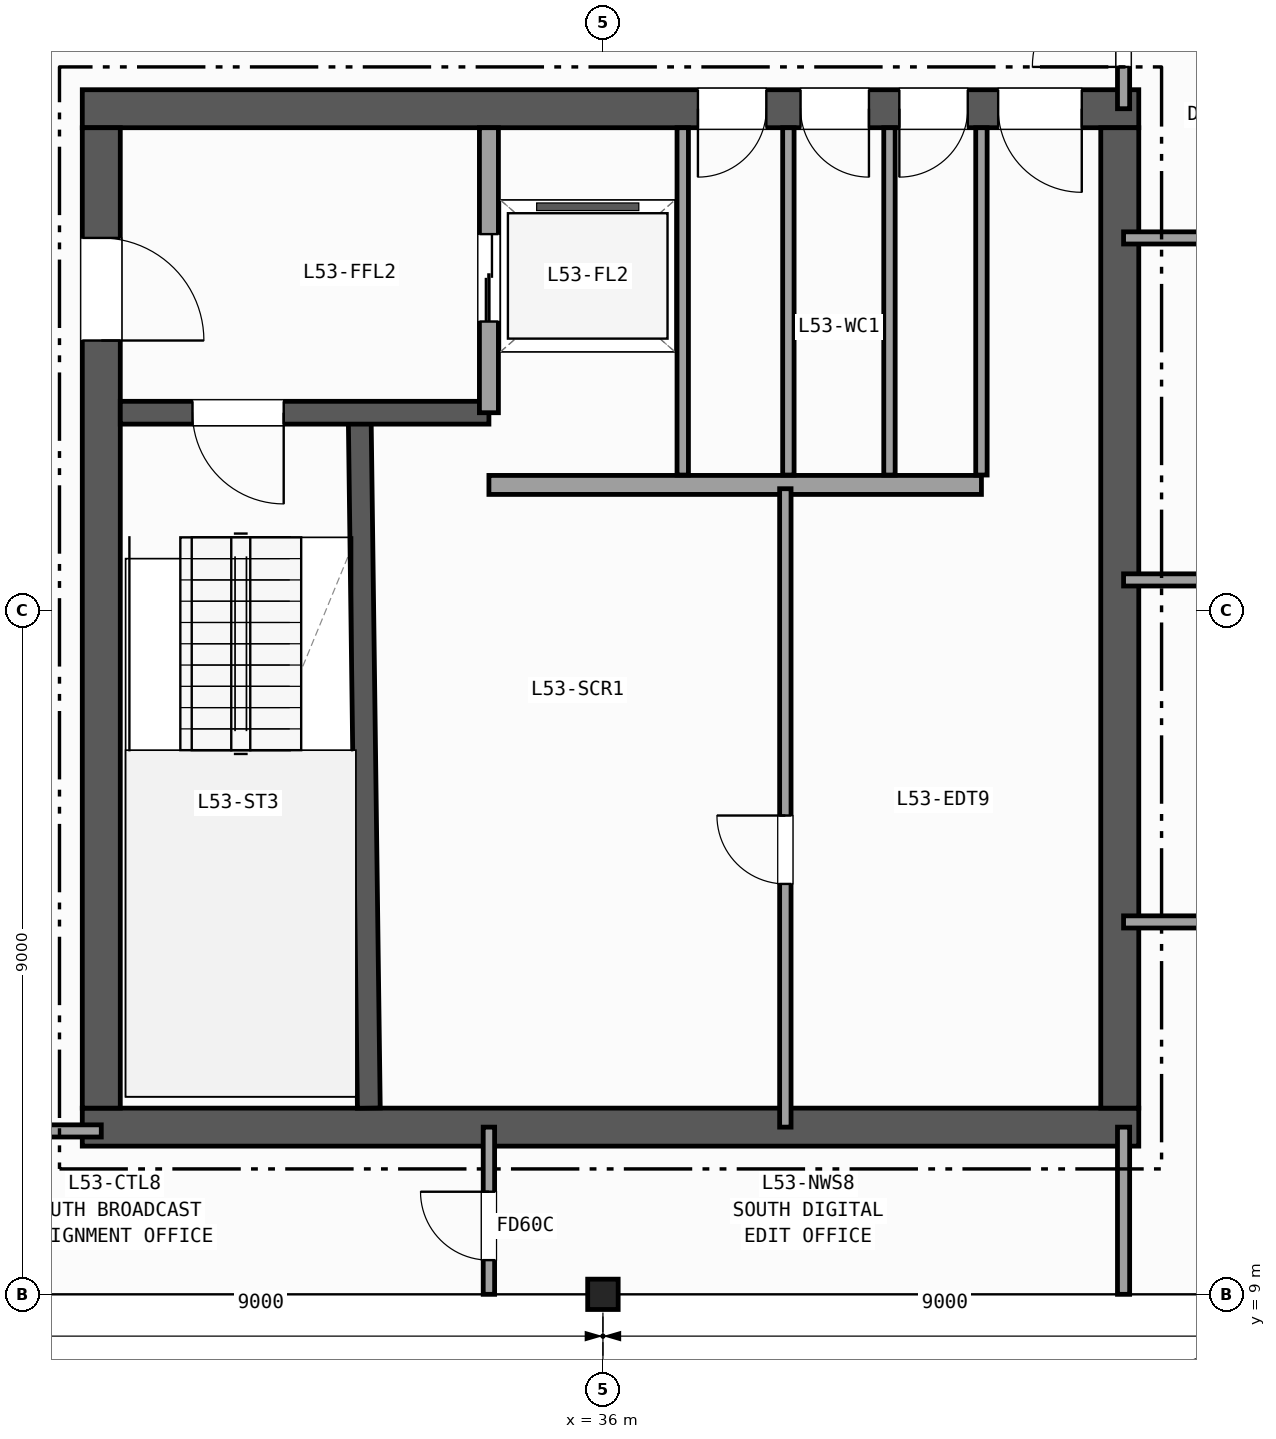
"""IFC4 building model, lengths in metres.
Left out: names, types, materials, properties, quantities, classifications, styles, units other than length and angle.
Written with IfcOpenShell. Run it as: python <this file> out.ifc"""

import sys

from ifc_helpers import new_model, si_unit, direction, frame, frame_2d, origin, origin_2d, place, context, subcontext, project, spatial, rectangle, i_section, extrude, element, fill, save


model = new_model("IFC4")
c1 = context("Model", 3, precision=1e-05, world=origin(), true_north=direction((0.0, 1.0)))
c2 = subcontext(c1, "Body", "Model", "MODEL_VIEW")
j1 = project(units=[si_unit("LENGTHUNIT", "METRE"), si_unit("PLANEANGLEUNIT", "RADIAN")], contexts=[c1])
p1 = place(None, origin())
s1 = spatial("IfcSite", under=j1, at=p1, CompositionType="ELEMENT")
p2 = place(p1, origin())
s2 = spatial("IfcBuilding", under=s1, at=p2, CompositionType="ELEMENT")
p3 = place(p2, frame((0.0, 0.0, 213.6)))
s3 = spatial("IfcBuildingStorey", under=s2, at=p3, CompositionType="ELEMENT", Elevation=213.6)
p4 = place(p3, frame((36.0, 9.0, 0.0), z_axis=(0.0, 0.0, 1.0), x_axis=(1.0, 0.0, 0.0)))
e1 = element("IfcColumn", 1, at=p4, inside=s3, PredefinedType="COLUMN", context=c2, shape_type="SweptSolid", body=[
    extrude(i_section(OverallWidth=0.401, OverallDepth=0.399, WebThickness=0.025, FlangeThickness=0.04, FilletRadius=0.015, at=origin_2d()), origin(), (0.0, 0.0, 1.0), 3.7),
])
p5 = place(p3, frame((29.15, 11.2, 0.0), z_axis=(0.0, 0.0, 1.0), x_axis=(1.0, 0.0, 0.0)))
e2 = element("IfcWall", 2, at=p5, inside=s3, PredefinedType="SHEAR", context=c2, shape_type="SweptSolid", body=[
    extrude(rectangle(XDim=13.9, YDim=0.5, at=frame_2d((6.95, 0.0))), origin(), (0.0, 0.0, 1.0), 3.42),
])
p6 = place(p3, frame((43.05, 24.6, 0.0), z_axis=(0.0, 0.0, 1.0), x_axis=(-1.0, 0.0, 0.0)))
e3 = element("IfcWall", 3, at=p6, inside=s3, PredefinedType="SHEAR", context=c2, shape_type="SweptSolid", body=[
    extrude(rectangle(XDim=13.9, YDim=0.5, at=frame_2d((6.95, 0.0))), origin(), (0.0, 0.0, 1.0), 3.42),
])
p7 = place(p6, frame((0.75, 0.0, 0.0)))
e4 = element("IfcOpeningElement", 4, at=p7, cuts=e3, PredefinedType="OPENING", context=c2, shape_type="SweptSolid", body=[
    extrude(rectangle(XDim=1.1, YDim=2.15, at=frame_2d((0.55, 1.075))), frame((0.0, 0.26, 0.0), z_axis=(0.0, -1.0, 0.0), x_axis=(1.0, 0.0, 0.0)), (0.0, 0.0, 1.0), 0.52),
])
p8 = place(p6, frame((2.25, 0.0, 0.0)))
e5 = element("IfcOpeningElement", 5, at=p8, cuts=e3, PredefinedType="OPENING", context=c2, shape_type="SweptSolid", body=[
    extrude(rectangle(XDim=0.9, YDim=2.1, at=frame_2d((0.45, 1.05))), frame((0.0, 0.26, 0.0), z_axis=(0.0, -1.0, 0.0), x_axis=(1.0, 0.0, 0.0)), (0.0, 0.0, 1.0), 0.52),
])
p9 = place(p6, frame((3.55, 0.0, 0.0)))
e6 = element("IfcOpeningElement", 6, at=p9, cuts=e3, PredefinedType="OPENING", context=c2, shape_type="SweptSolid", body=[
    extrude(rectangle(XDim=0.9, YDim=2.1, at=frame_2d((0.45, 1.05))), frame((0.0, 0.26, 0.0), z_axis=(0.0, -1.0, 0.0), x_axis=(1.0, 0.0, 0.0)), (0.0, 0.0, 1.0), 0.52),
])
p10 = place(p6, frame((4.9, 0.0, 0.0)))
e7 = element("IfcOpeningElement", 7, at=p10, cuts=e3, PredefinedType="OPENING", context=c2, shape_type="SweptSolid", body=[
    extrude(rectangle(XDim=0.9, YDim=2.1, at=frame_2d((0.45, 1.05))), frame((0.0, 0.26, 0.0), z_axis=(0.0, -1.0, 0.0), x_axis=(1.0, 0.0, 0.0)), (0.0, 0.0, 1.0), 0.52),
])
p11 = place(p3, frame((29.4, 24.35, 0.0), z_axis=(0.0, 0.0, 1.0), x_axis=(0.0, -1.0, 0.0)))
e8 = element("IfcWall", 8, at=p11, inside=s3, PredefinedType="SHEAR", context=c2, shape_type="SweptSolid", body=[
    extrude(rectangle(XDim=12.9, YDim=0.5, at=frame_2d((6.45, 0.0))), origin(), (0.0, 0.0, 1.0), 3.42),
])
p12 = place(p11, frame((1.45, 0.0, 0.0)))
e9 = element("IfcOpeningElement", 9, at=p12, cuts=e8, PredefinedType="OPENING", context=c2, shape_type="SweptSolid", body=[
    extrude(rectangle(XDim=1.35, YDim=2.15, at=frame_2d((0.675, 1.075))), frame((0.0, 0.26, 0.0), z_axis=(0.0, -1.0, 0.0), x_axis=(1.0, 0.0, 0.0)), (0.0, 0.0, 1.0), 0.52),
])
p13 = place(p3, frame((42.8, 11.45, 0.0), z_axis=(0.0, 0.0, 1.0), x_axis=(0.0, 1.0, 0.0)))
e10 = element("IfcWall", 10, at=p13, inside=s3, PredefinedType="SHEAR", context=c2, shape_type="SweptSolid", body=[
    extrude(rectangle(XDim=12.9, YDim=0.5, at=frame_2d((6.45, 0.0))), origin(), (0.0, 0.0, 1.0), 3.42),
])
p14 = place(p3, frame((32.92, 11.45, 0.0), z_axis=(0.0, 0.0, 1.0), x_axis=(-0.013171578211, 0.999913251001, 0.0)))
e11 = element("IfcWall", 11, at=p14, inside=s3, PredefinedType="SHEAR", context=c2, shape_type="SweptSolid", body=[
    extrude(rectangle(XDim=9.101, YDim=0.3, at=frame_2d((4.55, 0.0))), origin(), (0.0, 0.0, 1.0), 3.42),
])
p15 = place(p3, frame((34.5, 20.6, 0.0), z_axis=(0.0, 0.0, 1.0), x_axis=(-1.0, 0.0, 0.0)))
e12 = element("IfcWall", 12, at=p15, inside=s3, PredefinedType="SHEAR", context=c2, shape_type="SweptSolid", body=[
    extrude(rectangle(XDim=4.85, YDim=0.3, at=frame_2d((2.425, 0.0))), origin(), (0.0, 0.0, 1.0), 3.42),
])
p16 = place(p15, frame((2.7, 0.0, 0.0)))
e13 = element("IfcOpeningElement", 13, at=p16, cuts=e12, PredefinedType="OPENING", context=c2, shape_type="SweptSolid", body=[
    extrude(rectangle(XDim=1.2, YDim=2.15, at=frame_2d((0.6, 1.075))), frame((0.0, 0.16, 0.0), z_axis=(0.0, -1.0, 0.0), x_axis=(1.0, 0.0, 0.0)), (0.0, 0.0, 1.0), 0.32),
])
p17 = place(p3, frame((34.5, 20.6, 0.0), z_axis=(0.0, 0.0, 1.0), x_axis=(0.0, 1.0, 0.0)))
e14 = element("IfcWall", 14, at=p17, inside=s3, PredefinedType="PARTITIONING", context=c2, shape_type="SweptSolid", body=[
    extrude(rectangle(XDim=3.75, YDim=0.25, at=frame_2d((1.875, 0.0))), origin(), (0.0, 0.0, 1.0), 3.42),
])
p18 = place(p17, frame((1.2, 0.0, 0.0)))
e15 = element("IfcOpeningElement", 15, at=p18, cuts=e14, PredefinedType="OPENING", context=c2, shape_type="SweptSolid", body=[
    extrude(rectangle(XDim=1.15, YDim=2.15, at=frame_2d((0.575, 1.075))), frame((0.0, 0.135, 0.0), z_axis=(0.0, -1.0, 0.0), x_axis=(1.0, 0.0, 0.0)), (0.0, 0.0, 1.0), 0.27),
])
p19 = place(p3, frame((34.5, 19.65, 0.0), z_axis=(0.0, 0.0, 1.0), x_axis=(1.0, 0.0, 0.0)))
e16 = element("IfcWall", 16, at=p19, inside=s3, PredefinedType="PARTITIONING", context=c2, shape_type="SweptSolid", body=[
    extrude(rectangle(XDim=6.48, YDim=0.25, at=frame_2d((3.24, 0.0))), origin(), (0.0, 0.0, 1.0), 3.42),
])
p20 = place(p3, frame((38.4, 11.2, 0.0), z_axis=(0.0, 0.0, 1.0), x_axis=(0.0, 1.0, 0.0)))
e17 = element("IfcWall", 17, at=p20, inside=s3, PredefinedType="PARTITIONING", context=c2, shape_type="SweptSolid", body=[
    extrude(rectangle(XDim=8.4, YDim=0.15, at=frame_2d((4.2, 0.0))), origin(), (0.0, 0.0, 1.0), 3.42),
])
p21 = place(p20, frame((3.2, 0.0, 0.0)))
e18 = element("IfcOpeningElement", 18, at=p21, cuts=e17, PredefinedType="OPENING", context=c2, shape_type="SweptSolid", body=[
    extrude(rectangle(XDim=0.9, YDim=2.1, at=frame_2d((0.45, 1.05))), frame((0.0, 0.085, 0.0), z_axis=(0.0, -1.0, 0.0), x_axis=(1.0, 0.0, 0.0)), (0.0, 0.0, 1.0), 0.17),
])
for number, where, z_axis, x_axis in (
    (19, (37.05, 19.78, 0.0), (0.0, 0.0, 1.0), (0.0, 1.0, 0.0)),
    (20, (38.44, 19.78, 0.0), (0.0, 0.0, 1.0), (0.0, 1.0, 0.0)),
    (21, (39.77, 19.78, 0.0), (0.0, 0.0, 1.0), (0.0, 1.0, 0.0)),
    (22, (40.98, 19.78, 0.0), (0.0, 0.0, 1.0), (0.0, 1.0, 0.0)),
):
    element("IfcWall", number, at=place(p3, frame(where, z_axis=z_axis, x_axis=x_axis)), inside=s3, PredefinedType="PARTITIONING", context=c2, shape_type="SweptSolid", body=[
        extrude(rectangle(XDim=4.57, YDim=0.15, at=frame_2d((2.285, 0.0))), origin(), (0.0, 0.0, 1.0), 3.42),
    ])
p22 = place(p3, frame((24.65, 11.15, 0.0), z_axis=(0.0, 0.0, 1.0), x_axis=(1.0, 0.0, 0.0)))
e23 = element("IfcWall", 23, at=p22, inside=s3, PredefinedType="PARTITIONING", context=c2, shape_type="SweptSolid", body=[
    extrude(rectangle(XDim=4.75, YDim=0.16, at=frame_2d((2.375, 0.0))), origin(), (0.0, 0.0, 1.0), 2.792),
])
p23 = place(p22, frame((1.2, 0.0, 0.0)))
e24 = element("IfcOpeningElement", 24, at=p23, cuts=e23, PredefinedType="OPENING", context=c2, shape_type="SweptSolid", body=[
    extrude(rectangle(XDim=1.0, YDim=2.1, at=frame_2d((0.5, 1.05))), frame((0.0, 0.09, 0.0), z_axis=(0.0, -1.0, 0.0), x_axis=(1.0, 0.0, 0.0)), (0.0, 0.0, 1.0), 0.18),
])
p24 = place(p3, frame((34.5, 9.0, 0.0), z_axis=(0.0, 0.0, 1.0), x_axis=(0.0, 1.0, 0.0)))
e25 = element("IfcWall", 25, at=p24, inside=s3, PredefinedType="PARTITIONING", context=c2, shape_type="SweptSolid", body=[
    extrude(rectangle(XDim=2.2, YDim=0.15, at=frame_2d((1.1, 0.0))), origin(), (0.0, 0.0, 1.0), 2.707),
])
p25 = place(p24, frame((0.45, 0.0, 0.0)))
e26 = element("IfcOpeningElement", 26, at=p25, cuts=e25, PredefinedType="OPENING", context=c2, shape_type="SweptSolid", body=[
    extrude(rectangle(XDim=0.9, YDim=2.1, at=frame_2d((0.45, 1.05))), frame((0.0, 0.085, 0.0), z_axis=(0.0, -1.0, 0.0), x_axis=(1.0, 0.0, 0.0)), (0.0, 0.0, 1.0), 0.17),
])
p26 = place(p3, frame((42.85, 9.0, 0.0), z_axis=(0.0, 0.0, 1.0), x_axis=(0.0, 1.0, 0.0)))
e27 = element("IfcWall", 27, at=p26, inside=s3, PredefinedType="PARTITIONING", context=c2, shape_type="SweptSolid", body=[
    extrude(rectangle(XDim=2.2, YDim=0.16, at=frame_2d((1.1, 0.0))), origin(), (0.0, 0.0, 1.0), 2.707),
])
p27 = place(p3, frame((42.85, 24.6, 0.0), z_axis=(0.0, 0.0, 1.0), x_axis=(0.0, 1.0, 0.0)))
e28 = element("IfcWall", 28, at=p27, inside=s3, PredefinedType="PARTITIONING", context=c2, shape_type="SweptSolid", body=[
    extrude(rectangle(XDim=2.4, YDim=0.16, at=frame_2d((1.2, 0.0))), origin(), (0.0, 0.0, 1.0), 2.707),
])
p28 = place(p27, frame((0.55, 0.0, 0.0)))
e29 = element("IfcOpeningElement", 29, at=p28, cuts=e28, PredefinedType="OPENING", context=c2, shape_type="SweptSolid", body=[
    extrude(rectangle(XDim=1.2, YDim=2.15, at=frame_2d((0.6, 1.075))), frame((0.0, 0.09, 0.0), z_axis=(0.0, -1.0, 0.0), x_axis=(1.0, 0.0, 0.0)), (0.0, 0.0, 1.0), 0.18),
])
p29 = place(p3, frame((42.85, 13.9, 0.0), z_axis=(0.0, 0.0, 1.0), x_axis=(1.0, 0.0, 0.0)))
e30 = element("IfcWall", 30, at=p29, inside=s3, PredefinedType="PARTITIONING", context=c2, shape_type="SweptSolid", body=[
    extrude(rectangle(XDim=11.865, YDim=0.16, at=frame_2d((5.933, 0.0))), origin(), (0.0, 0.0, 1.0), 3.42),
])
p30 = place(p29, frame((4.6, 0.0, 0.0)))
e31 = element("IfcOpeningElement", 31, at=p30, cuts=e30, PredefinedType="OPENING", context=c2, shape_type="SweptSolid", body=[
    extrude(rectangle(XDim=0.86, YDim=2.05, at=frame_2d((0.43, 1.025))), frame((0.0, 0.09, 0.0), z_axis=(0.0, -1.0, 0.0), x_axis=(1.0, 0.0, 0.0)), (0.0, 0.0, 1.0), 0.18),
])
p31 = place(p3, frame((42.85, 18.4, 0.0), z_axis=(0.0, 0.0, 1.0), x_axis=(1.0, 0.0, 0.0)))
e32 = element("IfcWall", 32, at=p31, inside=s3, PredefinedType="PARTITIONING", context=c2, shape_type="SweptSolid", body=[
    extrude(rectangle(XDim=11.15, YDim=0.16, at=frame_2d((5.575, 0.0))), origin(), (0.0, 0.0, 1.0), 3.42),
])
p32 = place(p31, frame((4.6, 0.0, 0.0)))
e33 = element("IfcOpeningElement", 33, at=p32, cuts=e32, PredefinedType="OPENING", context=c2, shape_type="SweptSolid", body=[
    extrude(rectangle(XDim=0.95, YDim=2.1, at=frame_2d((0.475, 1.05))), frame((0.0, 0.09, 0.0), z_axis=(0.0, -1.0, 0.0), x_axis=(1.0, 0.0, 0.0)), (0.0, 0.0, 1.0), 0.18),
])
p33 = place(p3, frame((42.85, 22.9, 0.0), z_axis=(0.0, 0.0, 1.0), x_axis=(1.0, 0.0, 0.0)))
e34 = element("IfcWall", 34, at=p33, inside=s3, PredefinedType="PARTITIONING", context=c2, shape_type="SweptSolid", body=[
    extrude(rectangle(XDim=11.653, YDim=0.16, at=frame_2d((5.826, 0.0))), origin(), (0.0, 0.0, 1.0), 3.42),
])
p34 = place(p33, frame((4.6, 0.0, 0.0)))
e35 = element("IfcOpeningElement", 35, at=p34, cuts=e34, PredefinedType="OPENING", context=c2, shape_type="SweptSolid", body=[
    extrude(rectangle(XDim=1.0, YDim=2.1, at=frame_2d((0.5, 1.05))), frame((0.0, 0.09, 0.0), z_axis=(0.0, -1.0, 0.0), x_axis=(1.0, 0.0, 0.0)), (0.0, 0.0, 1.0), 0.18),
])
p35 = place(p16, origin())
e36 = element("IfcDoor", 36, at=p35, inside=s3, OperationType="SINGLE_SWING_LEFT", PredefinedType="DOOR", context=c2, shape_type="SweptSolid", body=[
    extrude(rectangle(XDim=1.2, YDim=2.15, at=frame_2d((0.6, 1.075))), frame((0.0, 0.025, 0.0), z_axis=(0.0, -1.0, 0.0), x_axis=(1.0, 0.0, 0.0)), (0.0, 0.0, 1.0), 0.05),
])
fill(e13, e36)
p36 = place(p12, origin())
e37 = element("IfcDoor", 37, at=p36, inside=s3, OperationType="SINGLE_SWING_RIGHT", PredefinedType="DOOR", context=c2, shape_type="SweptSolid", body=[
    extrude(rectangle(XDim=1.35, YDim=2.15, at=frame_2d((0.675, 1.075))), frame((0.0, 0.025, 0.0), z_axis=(0.0, -1.0, 0.0), x_axis=(1.0, 0.0, 0.0)), (0.0, 0.0, 1.0), 0.05),
])
fill(e9, e37)
p37 = place(p7, origin())
e38 = element("IfcDoor", 38, at=p37, inside=s3, OperationType="SINGLE_SWING_LEFT", PredefinedType="DOOR", context=c2, shape_type="SweptSolid", body=[
    extrude(rectangle(XDim=1.1, YDim=2.15, at=frame_2d((0.55, 1.075))), frame((0.0, 0.025, 0.0), z_axis=(0.0, -1.0, 0.0), x_axis=(1.0, 0.0, 0.0)), (0.0, 0.0, 1.0), 0.05),
])
fill(e4, e38)
p38 = place(p8, origin())
e39 = element("IfcDoor", 39, at=p38, inside=s3, OperationType="SINGLE_SWING_RIGHT", PredefinedType="DOOR", context=c2, shape_type="SweptSolid", body=[
    extrude(rectangle(XDim=0.9, YDim=2.1, at=frame_2d((0.45, 1.05))), frame((0.0, 0.025, 0.0), z_axis=(0.0, -1.0, 0.0), x_axis=(1.0, 0.0, 0.0)), (0.0, 0.0, 1.0), 0.05),
])
fill(e5, e39)
p39 = place(p9, origin())
e40 = element("IfcDoor", 40, at=p39, inside=s3, OperationType="SINGLE_SWING_LEFT", PredefinedType="DOOR", context=c2, shape_type="SweptSolid", body=[
    extrude(rectangle(XDim=0.9, YDim=2.1, at=frame_2d((0.45, 1.05))), frame((0.0, 0.025, 0.0), z_axis=(0.0, -1.0, 0.0), x_axis=(1.0, 0.0, 0.0)), (0.0, 0.0, 1.0), 0.05),
])
fill(e6, e40)
p40 = place(p10, origin())
e41 = element("IfcDoor", 41, at=p40, inside=s3, OperationType="SINGLE_SWING_RIGHT", PredefinedType="DOOR", context=c2, shape_type="SweptSolid", body=[
    extrude(rectangle(XDim=0.9, YDim=2.1, at=frame_2d((0.45, 1.05))), frame((0.0, 0.025, 0.0), z_axis=(0.0, -1.0, 0.0), x_axis=(1.0, 0.0, 0.0)), (0.0, 0.0, 1.0), 0.05),
])
fill(e7, e41)
p41 = place(p18, origin())
e42 = element("IfcDoor", 42, at=p41, inside=s3, OperationType="DOUBLE_DOOR_SLIDING", PredefinedType="DOOR", context=c2, shape_type="SweptSolid", body=[
    extrude(rectangle(XDim=1.15, YDim=2.15, at=frame_2d((0.575, 1.075))), frame((0.0, 0.025, 0.0), z_axis=(0.0, -1.0, 0.0), x_axis=(1.0, 0.0, 0.0)), (0.0, 0.0, 1.0), 0.05),
])
fill(e15, e42)
p42 = place(p21, origin())
e43 = element("IfcDoor", 43, at=p42, inside=s3, OperationType="SINGLE_SWING_RIGHT", PredefinedType="DOOR", context=c2, shape_type="SweptSolid", body=[
    extrude(rectangle(XDim=0.9, YDim=2.1, at=frame_2d((0.45, 1.05))), frame((0.0, 0.025, 0.0), z_axis=(0.0, -1.0, 0.0), x_axis=(1.0, 0.0, 0.0)), (0.0, 0.0, 1.0), 0.05),
])
fill(e18, e43)
p43 = place(p25, origin())
e44 = element("IfcDoor", 44, at=p43, inside=s3, OperationType="SINGLE_SWING_RIGHT", PredefinedType="DOOR", context=c2, shape_type="SweptSolid", body=[
    extrude(rectangle(XDim=0.9, YDim=2.1, at=frame_2d((0.45, 1.05))), frame((0.0, 0.025, 0.0), z_axis=(0.0, -1.0, 0.0), x_axis=(1.0, 0.0, 0.0)), (0.0, 0.0, 1.0), 0.05),
])
fill(e26, e44)
p44 = place(p28, origin())
e45 = element("IfcDoor", 45, at=p44, inside=s3, OperationType="SINGLE_SWING_LEFT", PredefinedType="DOOR", context=c2, shape_type="SweptSolid", body=[
    extrude(rectangle(XDim=1.2, YDim=2.15, at=frame_2d((0.6, 1.075))), frame((0.0, 0.025, 0.0), z_axis=(0.0, -1.0, 0.0), x_axis=(1.0, 0.0, 0.0)), (0.0, 0.0, 1.0), 0.05),
])
fill(e29, e45)
save(model, sys.argv[1])
